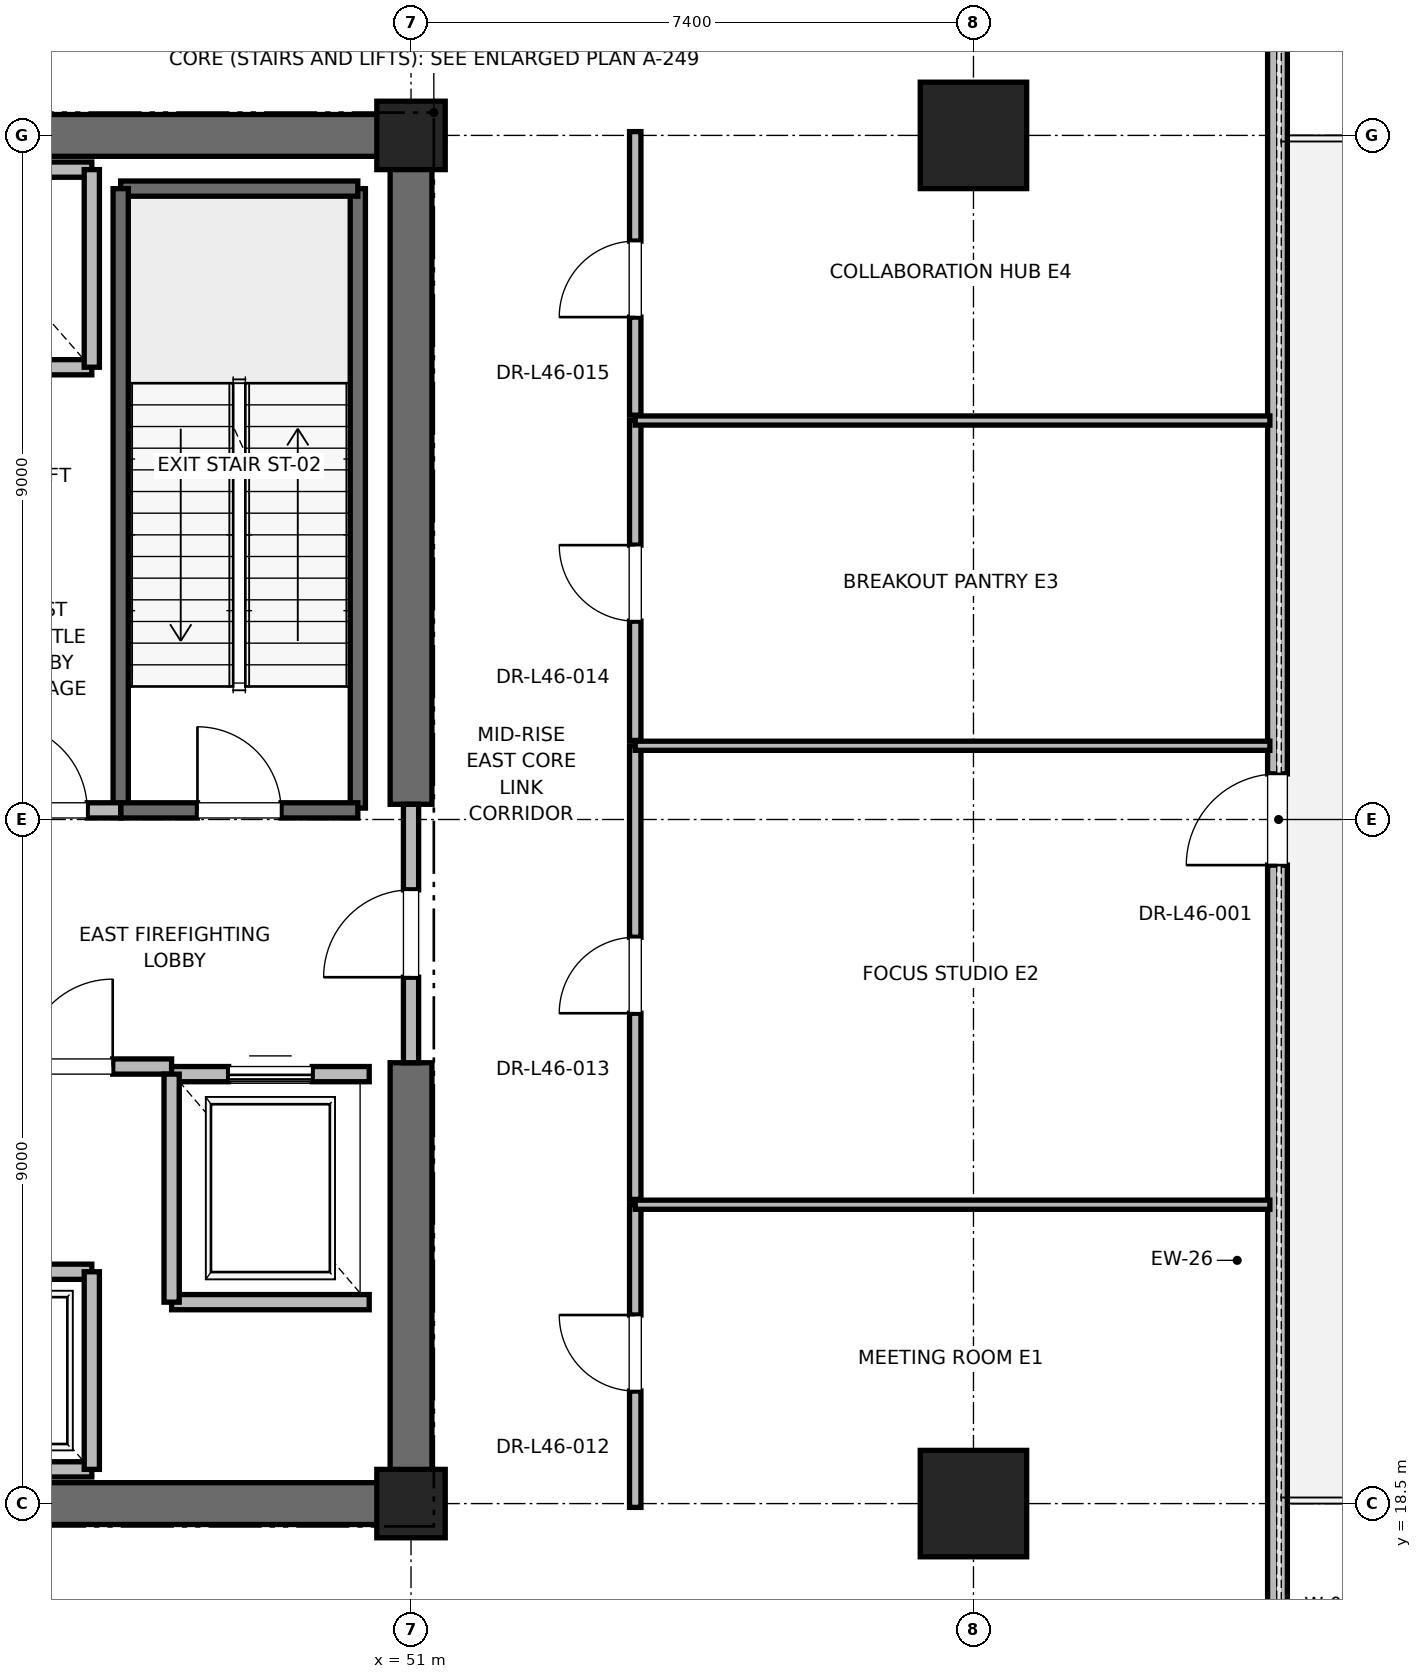
"""IFC4 building model, lengths in metres.
Left out: names, types, materials, properties, quantities, classifications, styles, units other than length and angle.
Written with IfcOpenShell. Run it as: python <this file> out.ifc"""

import sys

from ifc_helpers import new_model, si_unit, direction, frame, frame_2d, origin, origin_2d, place, context, subcontext, project, spatial, rectangle, extrude, element, fill, save


model = new_model("IFC4")
c1 = context("Model", 3, precision=1e-05, world=origin(), true_north=direction((0.0, 1.0)))
c2 = subcontext(c1, "Body", "Model", "MODEL_VIEW")
j1 = project(units=[si_unit("LENGTHUNIT", "METRE"), si_unit("PLANEANGLEUNIT", "RADIAN")], contexts=[c1])
p1 = place(None, origin())
s1 = spatial("IfcSite", under=j1, at=p1, CompositionType="ELEMENT")
p2 = place(p1, origin())
s2 = spatial("IfcBuilding", under=s1, at=p2, CompositionType="ELEMENT")
p3 = place(p2, frame((0.0, 0.0, 200.2)))
s3 = spatial("IfcBuildingStorey", under=s2, at=p3, CompositionType="ELEMENT", Elevation=200.2)
for number, where, z_axis, x_axis in (
    (1, (58.4, 18.5, 0.0), (0.0, 0.0, 1.0), (1.0, 0.0, 0.0)),
    (2, (58.4, 36.5, 0.0), (0.0, 0.0, 1.0), (1.0, 0.0, 0.0)),
):
    element("IfcColumn", number, at=place(p3, frame(where, z_axis=z_axis, x_axis=x_axis)), inside=s3, PredefinedType="COLUMN", context=c2, shape_type="SweptSolid", body=[
        extrude(rectangle(XDim=1.4, YDim=1.4, at=origin_2d()), origin(), (0.0, 0.0, 1.0), 5.0),
    ])
for number, where, z_axis, x_axis in (
    (3, (51.0, 18.5, 0.0), (0.0, 0.0, 1.0), (1.0, 0.0, 0.0)),
    (4, (51.0, 36.5, 0.0), (0.0, 0.0, 1.0), (1.0, 0.0, 0.0)),
):
    element("IfcColumn", number, at=place(p3, frame(where, z_axis=z_axis, x_axis=x_axis)), inside=s3, PredefinedType="PILASTER", context=c2, shape_type="SweptSolid", body=[
        extrude(rectangle(XDim=0.9, YDim=0.9, at=origin_2d()), origin(), (0.0, 0.0, 1.0), 5.0),
    ])
p4 = place(p3, frame((41.8, 18.5, 0.0), z_axis=(0.0, 0.0, 1.0), x_axis=(1.0, 0.0, 0.0)))
e5 = element("IfcWall", 5, at=p4, inside=s3, PredefinedType="SHEAR", context=c2, shape_type="SweptSolid", body=[
    extrude(rectangle(XDim=9.2, YDim=0.55, at=frame_2d((4.6, 0.0))), origin(), (0.0, 0.0, 1.0), 4.775),
])
for number, where, z_axis, x_axis in (
    (6, (45.2, 36.5, 0.0), (0.0, 0.0, 1.0), (1.0, 0.0, 0.0)),
    (7, (51.0, 18.5, 0.0), (0.0, 0.0, 1.0), (0.0, 1.0, 0.0)),
):
    element("IfcWall", number, at=place(p3, frame(where, z_axis=z_axis, x_axis=x_axis)), inside=s3, PredefinedType="SHEAR", context=c2, shape_type="SweptSolid", body=[
        extrude(rectangle(XDim=5.8, YDim=0.55, at=frame_2d((2.9, 0.0))), origin(), (0.0, 0.0, 1.0), 4.775),
    ])
p5 = place(p3, frame((51.0, 27.7, 0.0), z_axis=(0.0, 0.0, 1.0), x_axis=(0.0, 1.0, 0.0)))
e8 = element("IfcWall", 8, at=p5, inside=s3, PredefinedType="SHEAR", context=c2, shape_type="SweptSolid", body=[
    extrude(rectangle(XDim=8.8, YDim=0.55, at=frame_2d((4.4, 0.0))), origin(), (0.0, 0.0, 1.0), 4.775),
])
p6 = place(p3, frame((62.4, 10.3, 0.0), z_axis=(0.0, 0.0, 1.0), x_axis=(0.0, 1.0, 0.0)))
e9 = element("IfcWall", 9, at=p6, inside=s3, PredefinedType="PARAPET", context=c2, shape_type="SweptSolid", body=[
    extrude(rectangle(XDim=34.4, YDim=0.26, at=frame_2d((17.2, 0.0))), origin(), (0.0, 0.0, 1.0), 4.047),
])
p7 = place(p6, frame((4.2, 0.0, 0.85)))
e10 = element("IfcOpeningElement", 10, at=p7, cuts=e9, PredefinedType="OPENING", context=c2, shape_type="SweptSolid", body=[
    extrude(rectangle(XDim=2.0, YDim=2.3, at=frame_2d((1.0, 1.15))), frame((0.0, 0.13, 0.0), z_axis=(0.0, -1.0, 0.0), x_axis=(1.0, 0.0, 0.0)), (0.0, 0.0, 1.0), 0.26),
])
p8 = place(p6, frame((16.6, 0.0, 0.0)))
e11 = element("IfcOpeningElement", 11, at=p8, cuts=e9, PredefinedType="OPENING", context=c2, shape_type="SweptSolid", body=[
    extrude(rectangle(XDim=1.2, YDim=2.2, at=frame_2d((0.6, 1.1))), frame((0.0, 0.13, 0.0), z_axis=(0.0, -1.0, 0.0), x_axis=(1.0, 0.0, 0.0)), (0.0, 0.0, 1.0), 0.26),
])
p9 = place(p6, frame((28.2, 0.0, 0.85)))
e12 = element("IfcOpeningElement", 12, at=p9, cuts=e9, PredefinedType="OPENING", context=c2, shape_type="SweptSolid", body=[
    extrude(rectangle(XDim=2.0, YDim=2.3, at=frame_2d((1.0, 1.15))), frame((0.0, 0.13, 0.0), z_axis=(0.0, -1.0, 0.0), x_axis=(1.0, 0.0, 0.0)), (0.0, 0.0, 1.0), 0.26),
])
p10 = place(p3, frame((50.3, 27.65, 0.0), z_axis=(0.0, 0.0, 1.0), x_axis=(0.0, 1.0, 0.0)))
e13 = element("IfcWall", 13, at=p10, inside=s3, PredefinedType="SOLIDWALL", context=c2, shape_type="SweptSolid", body=[
    extrude(rectangle(XDim=8.15, YDim=0.2, at=frame_2d((4.075, 0.0))), origin(), (0.0, 0.0, 1.0), 4.775),
])
p11 = place(p3, frame((47.18, 35.8, 0.0), z_axis=(0.0, 0.0, 1.0), x_axis=(1.0, 0.0, 0.0)))
e14 = element("IfcWall", 14, at=p11, inside=s3, PredefinedType="SOLIDWALL", context=c2, shape_type="SweptSolid", body=[
    extrude(rectangle(XDim=3.12, YDim=0.2, at=frame_2d((1.56, 0.0))), origin(), (0.0, 0.0, 1.0), 4.775),
])
p12 = place(p3, frame((47.18, 27.62, 0.0), z_axis=(0.0, 0.0, 1.0), x_axis=(0.0, 1.0, 0.0)))
e15 = element("IfcWall", 15, at=p12, inside=s3, PredefinedType="SOLIDWALL", context=c2, shape_type="SweptSolid", body=[
    extrude(rectangle(XDim=8.18, YDim=0.2, at=frame_2d((4.09, 0.0))), origin(), (0.0, 0.0, 1.0), 4.775),
])
p13 = place(p3, frame((47.18, 27.62, 0.0), z_axis=(0.0, 0.0, 1.0), x_axis=(1.0, 0.0, 0.0)))
e16 = element("IfcWall", 16, at=p13, inside=s3, PredefinedType="SOLIDWALL", context=c2, shape_type="SweptSolid", body=[
    extrude(rectangle(XDim=3.12, YDim=0.2, at=frame_2d((1.56, 0.0))), origin(), (0.0, 0.0, 1.0), 4.775),
])
p14 = place(p13, frame((1.01, 0.0, 0.0)))
e17 = element("IfcOpeningElement", 17, at=p14, cuts=e16, PredefinedType="OPENING", context=c2, shape_type="SweptSolid", body=[
    extrude(rectangle(XDim=1.1, YDim=2.15, at=frame_2d((0.55, 1.075))), frame((0.0, 0.1, 0.0), z_axis=(0.0, -1.0, 0.0), x_axis=(1.0, 0.0, 0.0)), (0.0, 0.0, 1.0), 0.2),
])
p15 = place(p3, frame((45.15, 24.25, 0.0), z_axis=(0.0, 0.0, 1.0), x_axis=(1.0, 0.0, 0.0)))
e18 = element("IfcWall", 18, at=p15, inside=s3, PredefinedType="PARTITIONING", context=c2, shape_type="SweptSolid", body=[
    extrude(rectangle(XDim=2.7, YDim=0.2, at=frame_2d((1.35, 0.0))), origin(), (0.0, 0.0, 1.0), 4.775),
])
p16 = place(p15, frame((0.775, 0.0, 0.0)))
e19 = element("IfcOpeningElement", 19, at=p16, cuts=e18, PredefinedType="OPENING", context=c2, shape_type="SweptSolid", body=[
    extrude(rectangle(XDim=1.15, YDim=2.2, at=frame_2d((0.575, 1.1))), frame((0.0, 0.1, 0.0), z_axis=(0.0, -1.0, 0.0), x_axis=(1.0, 0.0, 0.0)), (0.0, 0.0, 1.0), 0.2),
])
p17 = place(p3, frame((45.15, 27.62, 0.0), z_axis=(0.0, 0.0, 1.0), x_axis=(1.0, 0.0, 0.0)))
e20 = element("IfcWall", 20, at=p17, inside=s3, PredefinedType="PARTITIONING", context=c2, shape_type="SweptSolid", body=[
    extrude(rectangle(XDim=2.03, YDim=0.2, at=frame_2d((1.015, 0.0))), origin(), (0.0, 0.0, 1.0), 4.775),
])
p18 = place(p17, frame((0.44, 0.0, 0.0)))
e21 = element("IfcOpeningElement", 21, at=p18, cuts=e20, PredefinedType="OPENING", context=c2, shape_type="SweptSolid", body=[
    extrude(rectangle(XDim=1.15, YDim=2.2, at=frame_2d((0.575, 1.1))), frame((0.0, 0.1, 0.0), z_axis=(0.0, -1.0, 0.0), x_axis=(1.0, 0.0, 0.0)), (0.0, 0.0, 1.0), 0.2),
])
p19 = place(p3, frame((51.0, 24.3, 0.0), z_axis=(0.0, 0.0, 1.0), x_axis=(0.0, 1.0, 0.0)))
e22 = element("IfcWall", 22, at=p19, inside=s3, PredefinedType="PARTITIONING", context=c2, shape_type="SweptSolid", body=[
    extrude(rectangle(XDim=3.4, YDim=0.2, at=frame_2d((1.7, 0.0))), origin(), (0.0, 0.0, 1.0), 3.755),
])
p20 = place(p19, frame((1.125, 0.0, 0.0)))
e23 = element("IfcOpeningElement", 23, at=p20, cuts=e22, PredefinedType="OPENING", context=c2, shape_type="SweptSolid", body=[
    extrude(rectangle(XDim=1.15, YDim=2.2, at=frame_2d((0.575, 1.1))), frame((0.0, 0.1, 0.0), z_axis=(0.0, -1.0, 0.0), x_axis=(1.0, 0.0, 0.0)), (0.0, 0.0, 1.0), 0.2),
])
p21 = place(p3, frame((47.85, 21.15, 0.0), z_axis=(0.0, 0.0, 1.0), x_axis=(1.0, 0.0, 0.0)))
e24 = element("IfcWall", 24, at=p21, inside=s3, PredefinedType="SOLIDWALL", context=c2, shape_type="SweptSolid", body=[
    extrude(rectangle(XDim=2.6, YDim=0.2, at=frame_2d((1.3, 0.0))), origin(), (0.0, 0.0, 1.0), 4.775),
])
p22 = place(p3, frame((50.45, 24.15, 0.0), z_axis=(0.0, 0.0, 1.0), x_axis=(-1.0, 0.0, 0.0)))
e25 = element("IfcWall", 25, at=p22, inside=s3, PredefinedType="SOLIDWALL", context=c2, shape_type="SweptSolid", body=[
    extrude(rectangle(XDim=2.6, YDim=0.2, at=frame_2d((1.3, 0.0))), origin(), (0.0, 0.0, 1.0), 3.755),
])
p23 = place(p22, frame((0.75, 0.0, 0.0)))
e26 = element("IfcOpeningElement", 26, at=p23, cuts=e25, PredefinedType="OPENING", context=c2, shape_type="SweptSolid", body=[
    extrude(rectangle(XDim=1.1, YDim=2.2, at=frame_2d((0.55, 1.1))), frame((0.0, 0.1, 0.0), z_axis=(0.0, -1.0, 0.0), x_axis=(1.0, 0.0, 0.0)), (0.0, 0.0, 1.0), 0.2),
])
p24 = place(p3, frame((47.85, 24.15, 0.0), z_axis=(0.0, 0.0, 1.0), x_axis=(0.0, -1.0, 0.0)))
e27 = element("IfcWall", 27, at=p24, inside=s3, PredefinedType="SOLIDWALL", context=c2, shape_type="SweptSolid", body=[
    extrude(rectangle(XDim=3.0, YDim=0.2, at=frame_2d((1.5, 0.0))), origin(), (0.0, 0.0, 1.0), 4.775),
])
p25 = place(p3, frame((44.5, 18.95, 0.0), z_axis=(0.0, 0.0, 1.0), x_axis=(1.0, 0.0, 0.0)))
e28 = element("IfcWall", 28, at=p25, inside=s3, PredefinedType="SOLIDWALL", context=c2, shape_type="SweptSolid", body=[
    extrude(rectangle(XDim=2.3, YDim=0.2, at=frame_2d((1.15, 0.0))), origin(), (0.0, 0.0, 1.0), 4.775),
])
p26 = place(p3, frame((46.8, 21.55, 0.0), z_axis=(0.0, 0.0, 1.0), x_axis=(-1.0, 0.0, 0.0)))
e29 = element("IfcWall", 29, at=p26, inside=s3, PredefinedType="SOLIDWALL", context=c2, shape_type="SweptSolid", body=[
    extrude(rectangle(XDim=2.3, YDim=0.2, at=frame_2d((1.15, 0.0))), origin(), (0.0, 0.0, 1.0), 4.775),
])
p27 = place(p26, frame((0.6, 0.0, 0.0)))
e30 = element("IfcOpeningElement", 30, at=p27, cuts=e29, PredefinedType="OPENING", context=c2, shape_type="SweptSolid", body=[
    extrude(rectangle(XDim=1.1, YDim=2.2, at=frame_2d((0.55, 1.1))), frame((0.0, 0.1, 0.0), z_axis=(0.0, -1.0, 0.0), x_axis=(1.0, 0.0, 0.0)), (0.0, 0.0, 1.0), 0.2),
])
p28 = place(p3, frame((46.8, 18.95, 0.0), z_axis=(0.0, 0.0, 1.0), x_axis=(0.0, 1.0, 0.0)))
e31 = element("IfcWall", 31, at=p28, inside=s3, PredefinedType="SOLIDWALL", context=c2, shape_type="SweptSolid", body=[
    extrude(rectangle(XDim=2.6, YDim=0.2, at=frame_2d((1.3, 0.0))), origin(), (0.0, 0.0, 1.0), 4.775),
])
p29 = place(p3, frame((44.5, 33.45, 0.0), z_axis=(0.0, 0.0, 1.0), x_axis=(1.0, 0.0, 0.0)))
e32 = element("IfcWall", 32, at=p29, inside=s3, PredefinedType="SOLIDWALL", context=c2, shape_type="SweptSolid", body=[
    extrude(rectangle(XDim=2.3, YDim=0.2, at=frame_2d((1.15, 0.0))), origin(), (0.0, 0.0, 1.0), 4.775),
])
p30 = place(p3, frame((46.8, 36.05, 0.0), z_axis=(0.0, 0.0, 1.0), x_axis=(-1.0, 0.0, 0.0)))
e33 = element("IfcWall", 33, at=p30, inside=s3, PredefinedType="SOLIDWALL", context=c2, shape_type="SweptSolid", body=[
    extrude(rectangle(XDim=2.3, YDim=0.2, at=frame_2d((1.15, 0.0))), origin(), (0.0, 0.0, 1.0), 3.755),
])
p31 = place(p3, frame((46.8, 33.45, 0.0), z_axis=(0.0, 0.0, 1.0), x_axis=(0.0, 1.0, 0.0)))
e34 = element("IfcWall", 34, at=p31, inside=s3, PredefinedType="SOLIDWALL", context=c2, shape_type="SweptSolid", body=[
    extrude(rectangle(XDim=2.6, YDim=0.2, at=frame_2d((1.3, 0.0))), origin(), (0.0, 0.0, 1.0), 4.775),
])
p32 = place(p3, frame((53.95, 18.45, 0.0), z_axis=(0.0, 0.0, 1.0), x_axis=(0.0, 1.0, 0.0)))
e35 = element("IfcWall", 35, at=p32, inside=s3, PredefinedType="PARTITIONING", context=c2, shape_type="SweptSolid", body=[
    extrude(rectangle(XDim=3.982, YDim=0.15, at=frame_2d((1.991, 0.0))), origin(), (0.0, 0.0, 1.0), 2.85),
])
p33 = place(p32, frame((1.531, 0.0, 0.0)))
e36 = element("IfcOpeningElement", 36, at=p33, cuts=e35, PredefinedType="OPENING", context=c2, shape_type="SweptSolid", body=[
    extrude(rectangle(XDim=1.0, YDim=2.15, at=frame_2d((0.5, 1.075))), frame((0.0, 0.075, 0.0), z_axis=(0.0, -1.0, 0.0), x_axis=(1.0, 0.0, 0.0)), (0.0, 0.0, 1.0), 0.15),
])
p34 = place(p3, frame((53.95, 22.432, 0.0), z_axis=(0.0, 0.0, 1.0), x_axis=(1.0, 0.0, 0.0)))
e37 = element("IfcWall", 37, at=p34, inside=s3, PredefinedType="PARTITIONING", context=c2, shape_type="SweptSolid", body=[
    extrude(rectangle(XDim=8.35, YDim=0.12, at=frame_2d((4.175, 0.0))), origin(), (0.0, 0.0, 1.0), 2.85),
])
p35 = place(p3, frame((53.95, 22.502, 0.0), z_axis=(0.0, 0.0, 1.0), x_axis=(0.0, 1.0, 0.0)))
e38 = element("IfcWall", 38, at=p35, inside=s3, PredefinedType="PARTITIONING", context=c2, shape_type="SweptSolid", body=[
    extrude(rectangle(XDim=5.968, YDim=0.15, at=frame_2d((2.984, 0.0))), origin(), (0.0, 0.0, 1.0), 2.85),
])
p36 = place(p35, frame((2.449, 0.0, 0.0)))
e39 = element("IfcOpeningElement", 39, at=p36, cuts=e38, PredefinedType="OPENING", context=c2, shape_type="SweptSolid", body=[
    extrude(rectangle(XDim=1.0, YDim=2.15, at=frame_2d((0.5, 1.075))), frame((0.0, 0.075, 0.0), z_axis=(0.0, -1.0, 0.0), x_axis=(1.0, 0.0, 0.0)), (0.0, 0.0, 1.0), 0.15),
])
p37 = place(p3, frame((53.95, 28.47, 0.0), z_axis=(0.0, 0.0, 1.0), x_axis=(1.0, 0.0, 0.0)))
e40 = element("IfcWall", 40, at=p37, inside=s3, PredefinedType="PARTITIONING", context=c2, shape_type="SweptSolid", body=[
    extrude(rectangle(XDim=8.35, YDim=0.12, at=frame_2d((4.175, 0.0))), origin(), (0.0, 0.0, 1.0), 2.85),
])
p38 = place(p3, frame((53.95, 28.54, 0.0), z_axis=(0.0, 0.0, 1.0), x_axis=(0.0, 1.0, 0.0)))
e41 = element("IfcWall", 41, at=p38, inside=s3, PredefinedType="PARTITIONING", context=c2, shape_type="SweptSolid", body=[
    extrude(rectangle(XDim=4.209, YDim=0.15, at=frame_2d((2.104, 0.0))), origin(), (0.0, 0.0, 1.0), 2.85),
])
p39 = place(p38, frame((1.57, 0.0, 0.0)))
e42 = element("IfcOpeningElement", 42, at=p39, cuts=e41, PredefinedType="OPENING", context=c2, shape_type="SweptSolid", body=[
    extrude(rectangle(XDim=1.0, YDim=2.15, at=frame_2d((0.5, 1.075))), frame((0.0, 0.075, 0.0), z_axis=(0.0, -1.0, 0.0), x_axis=(1.0, 0.0, 0.0)), (0.0, 0.0, 1.0), 0.15),
])
p40 = place(p3, frame((53.95, 32.749, 0.0), z_axis=(0.0, 0.0, 1.0), x_axis=(1.0, 0.0, 0.0)))
e43 = element("IfcWall", 43, at=p40, inside=s3, PredefinedType="PARTITIONING", context=c2, shape_type="SweptSolid", body=[
    extrude(rectangle(XDim=8.35, YDim=0.12, at=frame_2d((4.175, 0.0))), origin(), (0.0, 0.0, 1.0), 2.85),
])
p41 = place(p3, frame((53.95, 32.819, 0.0), z_axis=(0.0, 0.0, 1.0), x_axis=(0.0, 1.0, 0.0)))
e44 = element("IfcWall", 44, at=p41, inside=s3, PredefinedType="PARTITIONING", context=c2, shape_type="SweptSolid", body=[
    extrude(rectangle(XDim=3.731, YDim=0.15, at=frame_2d((1.865, 0.0))), origin(), (0.0, 0.0, 1.0), 2.85),
])
p42 = place(p41, frame((1.291, 0.0, 0.0)))
e45 = element("IfcOpeningElement", 45, at=p42, cuts=e44, PredefinedType="OPENING", context=c2, shape_type="SweptSolid", body=[
    extrude(rectangle(XDim=1.0, YDim=2.15, at=frame_2d((0.5, 1.075))), frame((0.0, 0.075, 0.0), z_axis=(0.0, -1.0, 0.0), x_axis=(1.0, 0.0, 0.0)), (0.0, 0.0, 1.0), 0.15),
])
p43 = place(p8, origin())
e46 = element("IfcDoor", 46, at=p43, inside=s3, OperationType="SINGLE_SWING_LEFT", PredefinedType="DOOR", context=c2, shape_type="SweptSolid", body=[
    extrude(rectangle(XDim=1.2, YDim=2.2, at=frame_2d((0.6, 1.1))), frame((0.0, 0.025, 0.0), z_axis=(0.0, -1.0, 0.0), x_axis=(1.0, 0.0, 0.0)), (0.0, 0.0, 1.0), 0.05),
])
fill(e11, e46)
p44 = place(p14, origin())
e47 = element("IfcDoor", 47, at=p44, inside=s3, OperationType="SINGLE_SWING_LEFT", PredefinedType="DOOR", context=c2, shape_type="SweptSolid", body=[
    extrude(rectangle(XDim=1.1, YDim=2.15, at=frame_2d((0.55, 1.075))), frame((0.0, 0.025, 0.0), z_axis=(0.0, -1.0, 0.0), x_axis=(1.0, 0.0, 0.0)), (0.0, 0.0, 1.0), 0.05),
])
fill(e17, e47)
p45 = place(p16, origin())
e48 = element("IfcDoor", 48, at=p45, inside=s3, OperationType="SINGLE_SWING_RIGHT", PredefinedType="DOOR", context=c2, shape_type="SweptSolid", body=[
    extrude(rectangle(XDim=1.15, YDim=2.2, at=frame_2d((0.575, 1.1))), frame((0.0, 0.025, 0.0), z_axis=(0.0, -1.0, 0.0), x_axis=(1.0, 0.0, 0.0)), (0.0, 0.0, 1.0), 0.05),
])
fill(e19, e48)
p46 = place(p18, origin())
e49 = element("IfcDoor", 49, at=p46, inside=s3, OperationType="SINGLE_SWING_LEFT", PredefinedType="DOOR", context=c2, shape_type="SweptSolid", body=[
    extrude(rectangle(XDim=1.15, YDim=2.2, at=frame_2d((0.575, 1.1))), frame((0.0, 0.025, 0.0), z_axis=(0.0, -1.0, 0.0), x_axis=(1.0, 0.0, 0.0)), (0.0, 0.0, 1.0), 0.05),
])
fill(e21, e49)
p47 = place(p20, origin())
e50 = element("IfcDoor", 50, at=p47, inside=s3, OperationType="SINGLE_SWING_LEFT", PredefinedType="DOOR", context=c2, shape_type="SweptSolid", body=[
    extrude(rectangle(XDim=1.15, YDim=2.2, at=frame_2d((0.575, 1.1))), frame((0.0, 0.025, 0.0), z_axis=(0.0, -1.0, 0.0), x_axis=(1.0, 0.0, 0.0)), (0.0, 0.0, 1.0), 0.05),
])
fill(e23, e50)
p48 = place(p23, origin())
e51 = element("IfcDoor", 51, at=p48, inside=s3, OperationType="SLIDING_TO_RIGHT", PredefinedType="DOOR", context=c2, shape_type="SweptSolid", body=[
    extrude(rectangle(XDim=1.1, YDim=2.2, at=frame_2d((0.55, 1.1))), frame((0.0, 0.025, 0.0), z_axis=(0.0, -1.0, 0.0), x_axis=(1.0, 0.0, 0.0)), (0.0, 0.0, 1.0), 0.05),
])
fill(e26, e51)
p49 = place(p33, origin())
e52 = element("IfcDoor", 52, at=p49, inside=s3, OperationType="SINGLE_SWING_RIGHT", PredefinedType="DOOR", context=c2, shape_type="SweptSolid", body=[
    extrude(rectangle(XDim=1.0, YDim=2.15, at=frame_2d((0.5, 1.075))), frame((0.0, 0.025, 0.0), z_axis=(0.0, -1.0, 0.0), x_axis=(1.0, 0.0, 0.0)), (0.0, 0.0, 1.0), 0.05),
])
fill(e36, e52)
p50 = place(p36, origin())
e53 = element("IfcDoor", 53, at=p50, inside=s3, OperationType="SINGLE_SWING_LEFT", PredefinedType="DOOR", context=c2, shape_type="SweptSolid", body=[
    extrude(rectangle(XDim=1.0, YDim=2.15, at=frame_2d((0.5, 1.075))), frame((0.0, 0.025, 0.0), z_axis=(0.0, -1.0, 0.0), x_axis=(1.0, 0.0, 0.0)), (0.0, 0.0, 1.0), 0.05),
])
fill(e39, e53)
p51 = place(p39, origin())
e54 = element("IfcDoor", 54, at=p51, inside=s3, OperationType="SINGLE_SWING_RIGHT", PredefinedType="DOOR", context=c2, shape_type="SweptSolid", body=[
    extrude(rectangle(XDim=1.0, YDim=2.15, at=frame_2d((0.5, 1.075))), frame((0.0, 0.025, 0.0), z_axis=(0.0, -1.0, 0.0), x_axis=(1.0, 0.0, 0.0)), (0.0, 0.0, 1.0), 0.05),
])
fill(e42, e54)
p52 = place(p42, origin())
e55 = element("IfcDoor", 55, at=p52, inside=s3, OperationType="SINGLE_SWING_LEFT", PredefinedType="DOOR", context=c2, shape_type="SweptSolid", body=[
    extrude(rectangle(XDim=1.0, YDim=2.15, at=frame_2d((0.5, 1.075))), frame((0.0, 0.025, 0.0), z_axis=(0.0, -1.0, 0.0), x_axis=(1.0, 0.0, 0.0)), (0.0, 0.0, 1.0), 0.05),
])
fill(e45, e55)
save(model, sys.argv[1])
